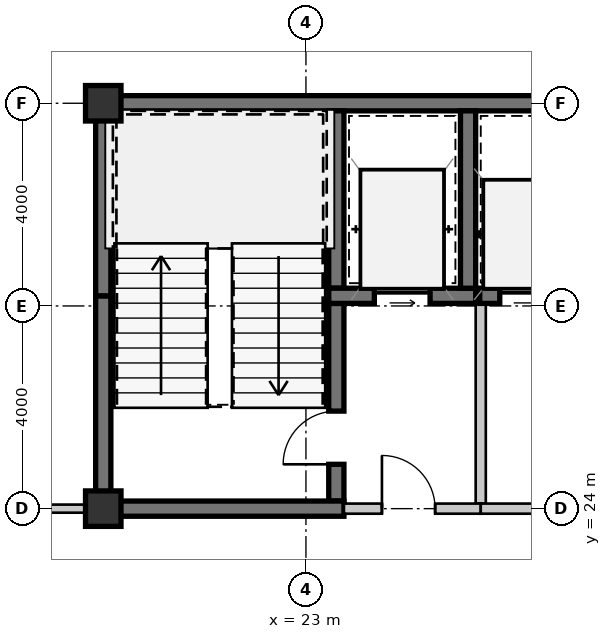
"""IFC4 building model, lengths in metres.
Left out: names, types, materials, properties, quantities, classifications, styles, units other than length and angle.
Written with IfcOpenShell. Run it as: python <this file> out.ifc"""

import sys

from ifc_helpers import new_model, si_unit, direction, frame, frame_2d, origin, origin_2d, place, context, subcontext, project, spatial, rectangle, extrude, source, transform, mapped, element, fill, save


model = new_model("IFC4")
c1 = context("Model", 3, precision=1e-05, world=origin(), true_north=direction((0.0, 1.0)))
c2 = subcontext(c1, "Body", "Model", "MODEL_VIEW")
j1 = project(units=[si_unit("LENGTHUNIT", "METRE"), si_unit("PLANEANGLEUNIT", "RADIAN")], contexts=[c1])
p1 = place(None, origin())
s1 = spatial("IfcSite", under=j1, at=p1, CompositionType="ELEMENT")
p2 = place(p1, origin())
s2 = spatial("IfcBuilding", under=s1, at=p2, CompositionType="ELEMENT")
p3 = place(p2, frame((0.0, 0.0, 106.05)))
s3 = spatial("IfcBuildingStorey", under=s2, at=p3, CompositionType="ELEMENT", Elevation=106.05)
m1 = source(origin(), c2, "Body", "SweptSolid", [
    extrude(rectangle(XDim=0.7, YDim=0.7, at=origin_2d()), origin(), (0.0, 0.0, 1.0), 3.15),
])
for number, where, z_axis, x_axis in (
    (1, (19.0, 24.0, 0.0), (0.0, 0.0, 1.0), (1.0, 0.0, 0.0)),
    (2, (19.0, 32.0, 0.0), (0.0, 0.0, 1.0), (1.0, 0.0, 0.0)),
):
    element("IfcColumn", number, at=place(p3, frame(where, z_axis=z_axis, x_axis=x_axis)), inside=s3, PredefinedType="COLUMN", context=c2, shape_type="MappedRepresentation", body=[
        mapped(m1, transform((0.0, 0.0, 0.0), scale=1.0)),
    ])
m2 = source(origin(), c2, "Body", "SweptSolid", [
    extrude(rectangle(XDim=9.15, YDim=0.3, at=frame_2d((4.575, 0.0))), origin(), (0.0, 0.0, 1.0), 2.93),
])
p4 = place(p3, frame((18.85, 32.0, 0.0), z_axis=(0.0, 0.0, 1.0), x_axis=(1.0, 0.0, 0.0)))
e3 = element("IfcWall", 3, at=p4, inside=s3, PredefinedType="SHEAR", context=c2, shape_type="MappedRepresentation", body=[
    mapped(m2, transform((0.0, 0.0, 0.0), scale=1.0)),
])
m3 = source(origin(), c2, "Body", "SweptSolid", [
    extrude(rectangle(XDim=4.05, YDim=0.3, at=frame_2d((2.025, 0.0))), origin(), (0.0, 0.0, 1.0), 2.93),
])
p5 = place(p3, frame((19.0, 24.15, 0.0), z_axis=(0.0, 0.0, 1.0), x_axis=(0.0, 1.0, 0.0)))
e4 = element("IfcWall", 4, at=p5, inside=s3, PredefinedType="SHEAR", context=c2, shape_type="MappedRepresentation", body=[
    mapped(m3, transform((0.0, 0.0, 0.0), scale=1.0)),
])
m4 = source(origin(), c2, "Body", "SweptSolid", [
    extrude(rectangle(XDim=3.65, YDim=0.3, at=frame_2d((1.825, 0.0))), origin(), (0.0, 0.0, 1.0), 2.93),
])
p6 = place(p3, frame((19.0, 28.2, 0.0), z_axis=(0.0, 0.0, 1.0), x_axis=(0.0, 1.0, 0.0)))
e5 = element("IfcWall", 5, at=p6, inside=s3, PredefinedType="SHEAR", context=c2, shape_type="MappedRepresentation", body=[
    mapped(m4, transform((0.0, 0.0, 0.0), scale=1.0)),
])
m5 = source(origin(), c2, "Body", "SweptSolid", [
    extrude(rectangle(XDim=3.5, YDim=0.3, at=frame_2d((1.75, 0.0))), origin(), (0.0, 0.0, 1.0), 2.93),
])
p7 = place(p3, frame((23.6, 28.35, 0.0), z_axis=(0.0, 0.0, 1.0), x_axis=(0.0, 1.0, 0.0)))
e6 = element("IfcWall", 6, at=p7, inside=s3, PredefinedType="SHEAR", context=c2, shape_type="MappedRepresentation", body=[
    mapped(m5, transform((0.0, 0.0, 0.0), scale=1.0)),
])
m6 = source(origin(), c2, "Body", "SweptSolid", [
    extrude(rectangle(XDim=3.9, YDim=0.3, at=frame_2d((1.95, 0.0))), origin(), (0.0, 0.0, 1.0), 2.93),
])
p8 = place(p3, frame((23.6, 24.15, 0.0), z_axis=(0.0, 0.0, 1.0), x_axis=(0.0, 1.0, 0.0)))
e7 = element("IfcWall", 7, at=p8, inside=s3, PredefinedType="SHEAR", context=c2, shape_type="MappedRepresentation", body=[
    mapped(m6, transform((0.0, 0.0, 0.0), scale=1.0)),
])
m7 = source(origin(), c2, "Body", "SweptSolid", [
    extrude(rectangle(XDim=1.05, YDim=2.1, at=frame_2d((0.525, 1.05))), frame((0.0, 0.16, 0.0), z_axis=(0.0, -1.0, 0.0), x_axis=(1.0, 0.0, 0.0)), (0.0, 0.0, 1.0), 0.32),
])
p9 = place(p8, frame((0.725, 0.0, 0.0)))
e8 = element("IfcOpeningElement", 8, at=p9, cuts=e7, PredefinedType="OPENING", context=c2, shape_type="MappedRepresentation", body=[
    mapped(m7, transform((0.0, 0.0, 0.0), scale=1.0)),
])
m8 = source(origin(), c2, "Body", "SweptSolid", [
    extrude(rectangle(XDim=4.9, YDim=0.3, at=frame_2d((2.45, 0.0))), origin(), (0.0, 0.0, 1.0), 2.93),
])
p10 = place(p3, frame((18.85, 24.0, 0.0), z_axis=(0.0, 0.0, 1.0), x_axis=(1.0, 0.0, 0.0)))
e9 = element("IfcWall", 9, at=p10, inside=s3, PredefinedType="SHEAR", context=c2, shape_type="MappedRepresentation", body=[
    mapped(m8, transform((0.0, 0.0, 0.0), scale=1.0)),
])
m9 = source(origin(), c2, "Body", "SweptSolid", [
    extrude(rectangle(XDim=2.9, YDim=0.3, at=frame_2d((1.45, 0.0))), origin(), (0.0, 0.0, 1.0), 2.93),
])
p11 = place(p3, frame((23.45, 28.2, 0.0), z_axis=(0.0, 0.0, 1.0), x_axis=(1.0, 0.0, 0.0)))
e10 = element("IfcWall", 10, at=p11, inside=s3, PredefinedType="SHEAR", context=c2, shape_type="MappedRepresentation", body=[
    mapped(m9, transform((0.0, 0.0, 0.0), scale=1.0)),
])
m10 = source(origin(), c2, "Body", "SweptSolid", [
    extrude(rectangle(XDim=1.1, YDim=2.15, at=frame_2d((0.55, 1.075))), frame((0.0, 0.16, 0.0), z_axis=(0.0, -1.0, 0.0), x_axis=(1.0, 0.0, 0.0)), (0.0, 0.0, 1.0), 0.32),
])
p12 = place(p11, frame((0.9, 0.0, 0.0)))
e11 = element("IfcOpeningElement", 11, at=p12, cuts=e10, PredefinedType="OPENING", context=c2, shape_type="MappedRepresentation", body=[
    mapped(m10, transform((0.0, 0.0, 0.0), scale=1.0)),
])
p13 = place(p3, frame((26.2, 28.35, 0.0), z_axis=(0.0, 0.0, 1.0), x_axis=(0.0, 1.0, 0.0)))
e12 = element("IfcWall", 12, at=p13, inside=s3, PredefinedType="SHEAR", context=c2, shape_type="MappedRepresentation", body=[
    mapped(m5, transform((0.0, 0.0, 0.0), scale=1.0)),
])
m11 = source(origin(), c2, "Body", "SweptSolid", [
    extrude(rectangle(XDim=3.95, YDim=0.2, at=frame_2d((1.975, 0.0))), origin(), (0.0, 0.0, 1.0), 2.93),
])
p14 = place(p3, frame((26.45, 24.1, 0.0), z_axis=(0.0, 0.0, 1.0), x_axis=(0.0, 1.0, 0.0)))
e13 = element("IfcWall", 13, at=p14, inside=s3, PredefinedType="SOLIDWALL", context=c2, shape_type="MappedRepresentation", body=[
    mapped(m11, transform((0.0, 0.0, 0.0), scale=1.0)),
])
m12 = source(origin(), c2, "Body", "SweptSolid", [
    extrude(rectangle(XDim=2.7, YDim=0.2, at=frame_2d((1.35, 0.0))), origin(), (0.0, 0.0, 1.0), 2.47),
])
p15 = place(p3, frame((23.75, 24.0, 0.0), z_axis=(0.0, 0.0, 1.0), x_axis=(1.0, 0.0, 0.0)))
e14 = element("IfcWall", 14, at=p15, inside=s3, PredefinedType="SOLIDWALL", context=c2, shape_type="MappedRepresentation", body=[
    mapped(m12, transform((0.0, 0.0, 0.0), scale=1.0)),
])
m13 = source(origin(), c2, "Body", "SweptSolid", [
    extrude(rectangle(XDim=1.05, YDim=2.1, at=frame_2d((0.525, 1.05))), frame((0.0, 0.11, 0.0), z_axis=(0.0, -1.0, 0.0), x_axis=(1.0, 0.0, 0.0)), (0.0, 0.0, 1.0), 0.22),
])
p16 = place(p15, frame((0.75, 0.0, 0.0)))
e15 = element("IfcOpeningElement", 15, at=p16, cuts=e14, PredefinedType="OPENING", context=c2, shape_type="MappedRepresentation", body=[
    mapped(m13, transform((0.0, 0.0, 0.0), scale=1.0)),
])
m14 = source(origin(), c2, "Body", "SweptSolid", [
    extrude(rectangle(XDim=2.07, YDim=0.3, at=frame_2d((1.035, 0.0))), origin(), (0.0, 0.0, 1.0), 2.93),
])
p17 = place(p3, frame((26.43, 28.2, 0.0), z_axis=(0.0, 0.0, 1.0), x_axis=(1.0, 0.0, 0.0)))
e16 = element("IfcWall", 16, at=p17, inside=s3, PredefinedType="SHEAR", context=c2, shape_type="MappedRepresentation", body=[
    mapped(m14, transform((0.0, 0.0, 0.0), scale=1.0)),
])
m15 = source(origin(), c2, "Body", "SweptSolid", [
    extrude(rectangle(XDim=1.05, YDim=2.15, at=frame_2d((0.525, 1.075))), frame((0.0, 0.16, 0.0), z_axis=(0.0, -1.0, 0.0), x_axis=(1.0, 0.0, 0.0)), (0.0, 0.0, 1.0), 0.32),
])
p18 = place(p17, frame((0.395, 0.0, 0.0)))
e17 = element("IfcOpeningElement", 17, at=p18, cuts=e16, PredefinedType="OPENING", context=c2, shape_type="MappedRepresentation", body=[
    mapped(m15, transform((0.0, 0.0, 0.0), scale=1.0)),
])
m16 = source(origin(), c2, "Body", "SweptSolid", [
    extrude(rectangle(XDim=4.35, YDim=0.2, at=frame_2d((2.175, 0.0))), origin(), (0.0, 0.0, 1.0), 2.47),
])
p19 = place(p3, frame((30.8, 24.0, 0.0), z_axis=(0.0, 0.0, 1.0), x_axis=(-1.0, 0.0, 0.0)))
e18 = element("IfcWall", 18, at=p19, inside=s3, PredefinedType="SOLIDWALL", context=c2, shape_type="MappedRepresentation", body=[
    mapped(m16, transform((0.0, 0.0, 0.0), scale=1.0)),
])
p20 = place(p19, frame((0.75, 0.0, 0.0)))
e19 = element("IfcOpeningElement", 19, at=p20, cuts=e18, PredefinedType="OPENING", context=c2, shape_type="MappedRepresentation", body=[
    mapped(m13, transform((0.0, 0.0, 0.0), scale=1.0)),
])
m17 = source(origin(), c2, "Body", "SweptSolid", [
    extrude(rectangle(XDim=4.17, YDim=0.16, at=frame_2d((2.085, 0.0))), origin(), (0.0, 0.0, 1.0), 2.93),
])
p21 = place(p3, frame((14.68, 24.0, 0.0), z_axis=(0.0, 0.0, 1.0), x_axis=(1.0, 0.0, 0.0)))
e20 = element("IfcWall", 20, at=p21, inside=s3, PredefinedType="PARTITIONING", context=c2, shape_type="MappedRepresentation", body=[
    mapped(m17, transform((0.0, 0.0, 0.0), scale=1.0)),
])
m18 = source(origin(), c2, "Body", "SweptSolid", [
    extrude(rectangle(XDim=0.92, YDim=2.1, at=frame_2d((0.46, 1.05))), frame((0.0, 0.09, 0.0), z_axis=(0.0, -1.0, 0.0), x_axis=(1.0, 0.0, 0.0)), (0.0, 0.0, 1.0), 0.18),
])
p22 = place(p21, frame((1.69, 0.0, 0.0)))
e21 = element("IfcOpeningElement", 21, at=p22, cuts=e20, PredefinedType="OPENING", context=c2, shape_type="MappedRepresentation", body=[
    mapped(m18, transform((0.0, 0.0, 0.0), scale=1.0)),
])
m19 = source(origin(), c2, "Body", "SweptSolid", [
    extrude(rectangle(XDim=1.05, YDim=2.1, at=frame_2d((0.525, 1.05))), frame((0.0, 0.025, 0.0), z_axis=(0.0, -1.0, 0.0), x_axis=(1.0, 0.0, 0.0)), (0.0, 0.0, 1.0), 0.05),
])
p23 = place(p9, origin())
e22 = element("IfcDoor", 22, at=p23, inside=s3, OperationType="SINGLE_SWING_LEFT", PredefinedType="DOOR", context=c2, shape_type="MappedRepresentation", body=[
    mapped(m19, transform((0.0, 0.0, 0.0), scale=1.0)),
])
fill(e8, e22)
m20 = source(origin(), c2, "Body", "SweptSolid", [
    extrude(rectangle(XDim=1.1, YDim=2.15, at=frame_2d((0.55, 1.075))), frame((0.0, 0.025, 0.0), z_axis=(0.0, -1.0, 0.0), x_axis=(1.0, 0.0, 0.0)), (0.0, 0.0, 1.0), 0.05),
])
p24 = place(p12, origin())
e23 = element("IfcDoor", 23, at=p24, inside=s3, OperationType="SLIDING_TO_LEFT", PredefinedType="DOOR", context=c2, shape_type="MappedRepresentation", body=[
    mapped(m20, transform((0.0, 0.0, 0.0), scale=1.0)),
])
fill(e11, e23)
p25 = place(p16, origin())
e24 = element("IfcDoor", 24, at=p25, inside=s3, OperationType="SINGLE_SWING_LEFT", PredefinedType="DOOR", context=c2, shape_type="MappedRepresentation", body=[
    mapped(m19, transform((0.0, 0.0, 0.0), scale=1.0)),
])
fill(e15, e24)
m21 = source(origin(), c2, "Body", "SweptSolid", [
    extrude(rectangle(XDim=1.05, YDim=2.15, at=frame_2d((0.525, 1.075))), frame((0.0, 0.025, 0.0), z_axis=(0.0, -1.0, 0.0), x_axis=(1.0, 0.0, 0.0)), (0.0, 0.0, 1.0), 0.05),
])
p26 = place(p18, origin())
e25 = element("IfcDoor", 25, at=p26, inside=s3, OperationType="SLIDING_TO_LEFT", PredefinedType="DOOR", context=c2, shape_type="MappedRepresentation", body=[
    mapped(m21, transform((0.0, 0.0, 0.0), scale=1.0)),
])
fill(e17, e25)
save(model, sys.argv[1])
